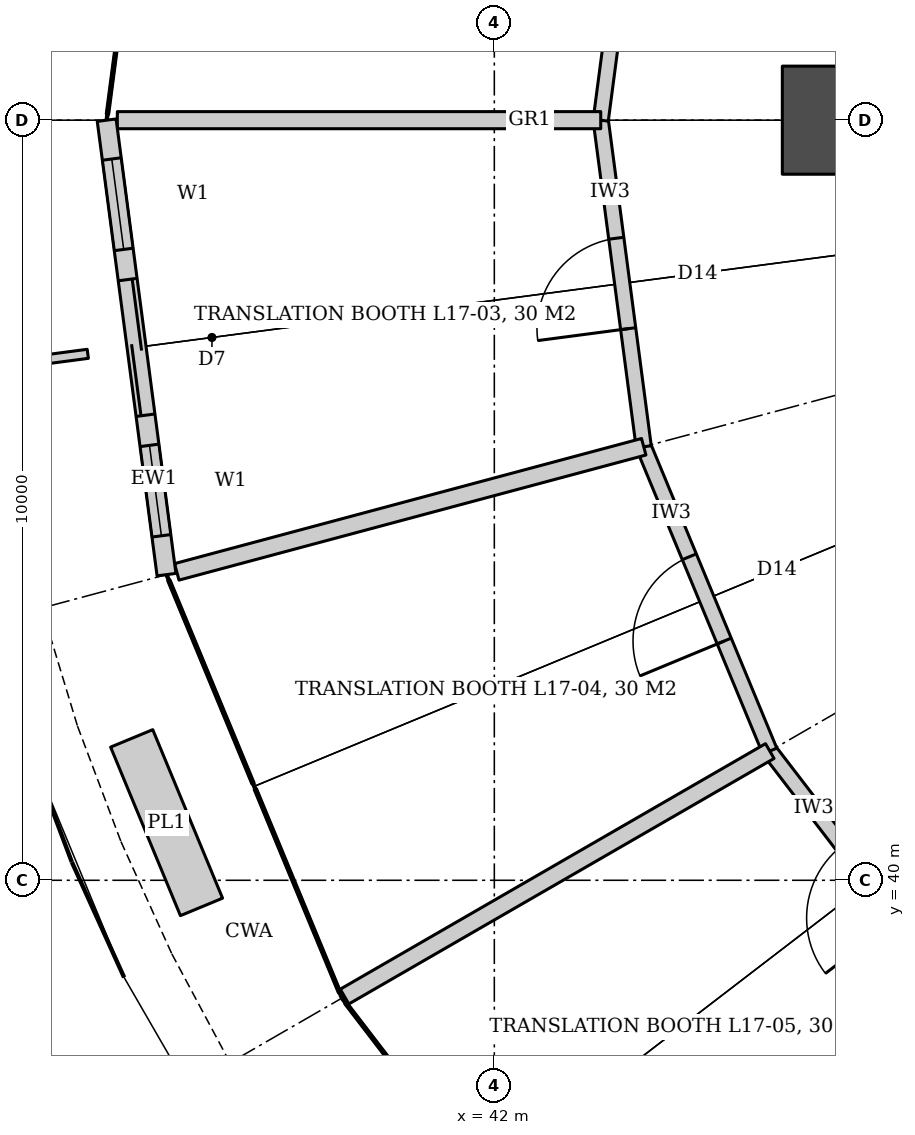
"""IFC4 building model, lengths in metres.
Left out: names, types, materials, properties, quantities, classifications, styles, units other than length and angle.
Written with IfcOpenShell. Run it as: python <this file> out.ifc"""

import sys

from ifc_helpers import new_model, si_unit, direction, frame, frame_2d, origin, origin_2d, place, context, subcontext, project, spatial, rectangle, hollow_circle, extrude, element, fill, save


model = new_model("IFC4")
c1 = context("Model", 3, precision=1e-05, world=origin(), true_north=direction((0.0, 1.0)))
c2 = subcontext(c1, "Body", "Model", "MODEL_VIEW")
j1 = project(units=[si_unit("LENGTHUNIT", "METRE"), si_unit("PLANEANGLEUNIT", "RADIAN")], contexts=[c1])
p1 = place(None, origin())
s1 = spatial("IfcSite", under=j1, at=p1, CompositionType="ELEMENT")
p2 = place(p1, origin())
s2 = spatial("IfcBuilding", under=s1, at=p2, CompositionType="ELEMENT")
p3 = place(p2, frame((0.0, 0.0, 80.6)))
s3 = spatial("IfcBuildingStorey", under=s2, at=p3, CompositionType="ELEMENT", Elevation=80.6)
p4 = place(p3, frame((46.5, 50.0, 0.0), z_axis=(0.0, 0.0, 1.0), x_axis=(1.0, 0.0, 0.0)))
e1 = element("IfcColumn", 1, at=p4, inside=s3, PredefinedType="COLUMN", context=c2, shape_type="SweptSolid", body=[
    extrude(hollow_circle(Radius=0.711, WallThickness=0.07, at=origin_2d()), origin(), (0.0, 0.0, 1.0), 4.2),
])
p5 = place(p3, frame((48.262, 38.262, 0.0), z_axis=(0.0, 0.0, 1.0), x_axis=(-0.60874374674, 0.79336690806, 0.0)))
e2 = element("IfcWall", 2, at=p5, inside=s3, PredefinedType="PARTITIONING", context=c2, shape_type="SweptSolid", body=[
    extrude(rectangle(XDim=4.333, YDim=0.2, at=frame_2d((2.167, 0.0))), origin(), (0.0, 0.0, 1.0), 3.04),
])
p6 = place(p5, frame((1.567, 0.0, 0.0)))
e3 = element("IfcOpeningElement", 3, at=p6, cuts=e2, PredefinedType="OPENING", context=c2, shape_type="SweptSolid", body=[
    extrude(rectangle(XDim=1.2, YDim=2.4, at=frame_2d((0.6, 1.2))), frame((0.0, 0.11, 0.0), z_axis=(0.0, -1.0, 0.0), x_axis=(1.0, 0.0, 0.0)), (0.0, 0.0, 1.0), 0.22),
])
p7 = place(p3, frame((45.624, 41.7, 0.0), z_axis=(0.0, 0.0, 1.0), x_axis=(-0.382698425325, 0.923873322082, 0.0)))
e4 = element("IfcWall", 4, at=p7, inside=s3, PredefinedType="PARTITIONING", context=c2, shape_type="SweptSolid", body=[
    extrude(rectangle(XDim=4.333, YDim=0.2, at=frame_2d((2.167, 0.0))), origin(), (0.0, 0.0, 1.0), 3.04),
])
p8 = place(p7, frame((1.567, 0.0, 0.0)))
e5 = element("IfcOpeningElement", 5, at=p8, cuts=e4, PredefinedType="OPENING", context=c2, shape_type="SweptSolid", body=[
    extrude(rectangle(XDim=1.2, YDim=2.4, at=frame_2d((0.6, 1.2))), frame((0.0, 0.11, 0.0), z_axis=(0.0, -1.0, 0.0), x_axis=(1.0, 0.0, 0.0)), (0.0, 0.0, 1.0), 0.22),
])
p9 = place(p3, frame((43.966, 45.704, 0.0), z_axis=(0.0, 0.0, 1.0), x_axis=(-0.130536124221, 0.99144355375, 0.0)))
e6 = element("IfcWall", 6, at=p9, inside=s3, PredefinedType="PARTITIONING", context=c2, shape_type="SweptSolid", body=[
    extrude(rectangle(XDim=4.333, YDim=0.2, at=frame_2d((2.167, 0.0))), origin(), (0.0, 0.0, 1.0), 3.04),
])
p10 = place(p9, frame((1.567, 0.0, 0.0)))
e7 = element("IfcOpeningElement", 7, at=p10, cuts=e6, PredefinedType="OPENING", context=c2, shape_type="SweptSolid", body=[
    extrude(rectangle(XDim=1.2, YDim=2.4, at=frame_2d((0.6, 1.2))), frame((0.0, 0.11, 0.0), z_axis=(0.0, -1.0, 0.0), x_axis=(1.0, 0.0, 0.0)), (0.0, 0.0, 1.0), 0.22),
])
p11 = place(p3, frame((43.4, 50.0, 0.0), z_axis=(0.0, 0.0, 1.0), x_axis=(0.130536124221, 0.99144355375, 0.0)))
e8 = element("IfcWall", 8, at=p11, inside=s3, PredefinedType="PARTITIONING", context=c2, shape_type="SweptSolid", body=[
    extrude(rectangle(XDim=4.333, YDim=0.2, at=frame_2d((2.167, 0.0))), origin(), (0.0, 0.0, 1.0), 3.04),
])
p12 = place(p3, frame((43.4, 50.0, 0.0), z_axis=(0.0, 0.0, 1.0), x_axis=(-1.0, 0.0, 0.0)))
e9 = element("IfcWall", 9, at=p12, inside=s3, PredefinedType="PARTITIONING", context=c2, shape_type="SweptSolid", body=[
    extrude(rectangle(XDim=6.36, YDim=0.225, at=frame_2d((3.18, 0.0))), origin(), (0.0, 0.0, 1.0), 3.04),
])
p13 = place(p3, frame((43.966, 45.704, 0.0), z_axis=(0.0, 0.0, 1.0), x_axis=(-0.965929717932, -0.258804520856, 0.0)))
e10 = element("IfcWall", 10, at=p13, inside=s3, PredefinedType="PARTITIONING", context=c2, shape_type="SweptSolid", body=[
    extrude(rectangle(XDim=6.36, YDim=0.225, at=frame_2d((3.18, 0.0))), origin(), (0.0, 0.0, 1.0), 3.04),
])
p14 = place(p3, frame((45.624, 41.7, 0.0), z_axis=(0.0, 0.0, 1.0), x_axis=(-0.866025099701, -0.500000526688, 0.0)))
e11 = element("IfcWall", 11, at=p14, inside=s3, PredefinedType="PARTITIONING", context=c2, shape_type="SweptSolid", body=[
    extrude(rectangle(XDim=6.46, YDim=0.225, at=frame_2d((3.23, 0.0))), origin(), (0.0, 0.0, 1.0), 3.04),
])
p15 = place(p3, frame((51.0, 41.0, 0.0), z_axis=(0.0, 0.0, 1.0), x_axis=(-0.707106781187, -0.707106781187, 0.0)))
e12 = element("IfcWall", 12, at=p15, inside=s3, PredefinedType="PARTITIONING", context=c2, shape_type="SweptSolid", body=[
    extrude(rectangle(XDim=10.332, YDim=0.225, at=frame_2d((5.166, 0.0))), origin(), (0.0, 0.0, 1.0), 3.02),
])
p16 = place(p15, frame((1.486, 0.0, 0.0)))
e13 = element("IfcOpeningElement", 13, at=p16, cuts=e12, PredefinedType="OPENING", context=c2, shape_type="SweptSolid", body=[
    extrude(rectangle(XDim=0.9, YDim=2.4, at=frame_2d((0.45, 1.2))), frame((0.0, 0.123, 0.0), z_axis=(0.0, -1.0, 0.0), x_axis=(1.0, 0.0, 0.0)), (0.0, 0.0, 1.0), 0.245),
])
p17 = place(p3, frame((36.9, 50.0, 0.0), z_axis=(0.0, 0.0, 1.0), x_axis=(0.130524679454, -0.991445060532, 0.0)))
e14 = element("IfcWall", 14, at=p17, inside=s3, PredefinedType="SOLIDWALL", context=c2, shape_type="SweptSolid", body=[
    extrude(rectangle(XDim=6.03, YDim=0.25, at=frame_2d((3.015, 0.0))), origin(), (0.0, 0.0, 1.0), 4.04),
])
p18 = place(p17, frame((2.115, 0.0, 0.0)))
e15 = element("IfcOpeningElement", 15, at=p18, cuts=e14, PredefinedType="OPENING", context=c2, shape_type="SweptSolid", body=[
    extrude(rectangle(XDim=1.8, YDim=2.4, at=frame_2d((0.9, 1.2))), frame((0.0, 0.135, 0.0), z_axis=(0.0, -1.0, 0.0), x_axis=(1.0, 0.0, 0.0)), (0.0, 0.0, 1.0), 0.27),
])
p19 = place(p17, frame((0.515, 0.0, 0.0)))
e16 = element("IfcOpeningElement", 16, at=p19, cuts=e14, PredefinedType="OPENING", context=c2, shape_type="SweptSolid", body=[
    extrude(rectangle(XDim=1.2, YDim=2.4, at=frame_2d((0.6, 1.2))), frame((0.0, 0.135, 0.0), z_axis=(0.0, -1.0, 0.0), x_axis=(1.0, 0.0, 0.0)), (0.0, 0.0, 1.0), 0.27),
])
p20 = place(p17, frame((4.315, 0.0, 0.0)))
e17 = element("IfcOpeningElement", 17, at=p20, cuts=e14, PredefinedType="OPENING", context=c2, shape_type="SweptSolid", body=[
    extrude(rectangle(XDim=1.2, YDim=2.4, at=frame_2d((0.6, 1.2))), frame((0.0, 0.135, 0.0), z_axis=(0.0, -1.0, 0.0), x_axis=(1.0, 0.0, 0.0)), (0.0, 0.0, 1.0), 0.27),
])
p21 = place(p10, origin())
e18 = element("IfcDoor", 18, at=p21, inside=s3, OperationType="SINGLE_SWING_LEFT", PredefinedType="DOOR", context=c2, shape_type="SweptSolid", body=[
    extrude(rectangle(XDim=1.2, YDim=2.4, at=frame_2d((0.6, 1.2))), frame((0.0, 0.025, 0.0), z_axis=(0.0, -1.0, 0.0), x_axis=(1.0, 0.0, 0.0)), (0.0, 0.0, 1.0), 0.05),
])
fill(e7, e18)
p22 = place(p8, origin())
e19 = element("IfcDoor", 19, at=p22, inside=s3, OperationType="SINGLE_SWING_LEFT", PredefinedType="DOOR", context=c2, shape_type="SweptSolid", body=[
    extrude(rectangle(XDim=1.2, YDim=2.4, at=frame_2d((0.6, 1.2))), frame((0.0, 0.025, 0.0), z_axis=(0.0, -1.0, 0.0), x_axis=(1.0, 0.0, 0.0)), (0.0, 0.0, 1.0), 0.05),
])
fill(e5, e19)
p23 = place(p18, origin())
e20 = element("IfcDoor", 20, at=p23, inside=s3, OperationType="DOUBLE_DOOR_SLIDING", PredefinedType="DOOR", context=c2, shape_type="SweptSolid", body=[
    extrude(rectangle(XDim=1.8, YDim=2.4, at=frame_2d((0.9, 1.2))), frame((0.0, 0.025, 0.0), z_axis=(0.0, -1.0, 0.0), x_axis=(1.0, 0.0, 0.0)), (0.0, 0.0, 1.0), 0.05),
])
fill(e15, e20)
p24 = place(p19, origin())
e21 = element("IfcWindow", 21, at=p24, inside=s3, PartitioningType="SINGLE_PANEL", PredefinedType="WINDOW", context=c2, shape_type="SweptSolid", body=[
    extrude(rectangle(XDim=1.2, YDim=2.4, at=frame_2d((0.6, 1.2))), frame((0.0, 0.03, 0.0), z_axis=(0.0, -1.0, 0.0), x_axis=(1.0, 0.0, 0.0)), (0.0, 0.0, 1.0), 0.06),
])
fill(e16, e21)
p25 = place(p20, origin())
e22 = element("IfcWindow", 22, at=p25, inside=s3, PartitioningType="SINGLE_PANEL", PredefinedType="WINDOW", context=c2, shape_type="SweptSolid", body=[
    extrude(rectangle(XDim=1.2, YDim=2.4, at=frame_2d((0.6, 1.2))), frame((0.0, 0.03, 0.0), z_axis=(0.0, -1.0, 0.0), x_axis=(1.0, 0.0, 0.0)), (0.0, 0.0, 1.0), 0.06),
])
fill(e17, e22)
save(model, sys.argv[1])
